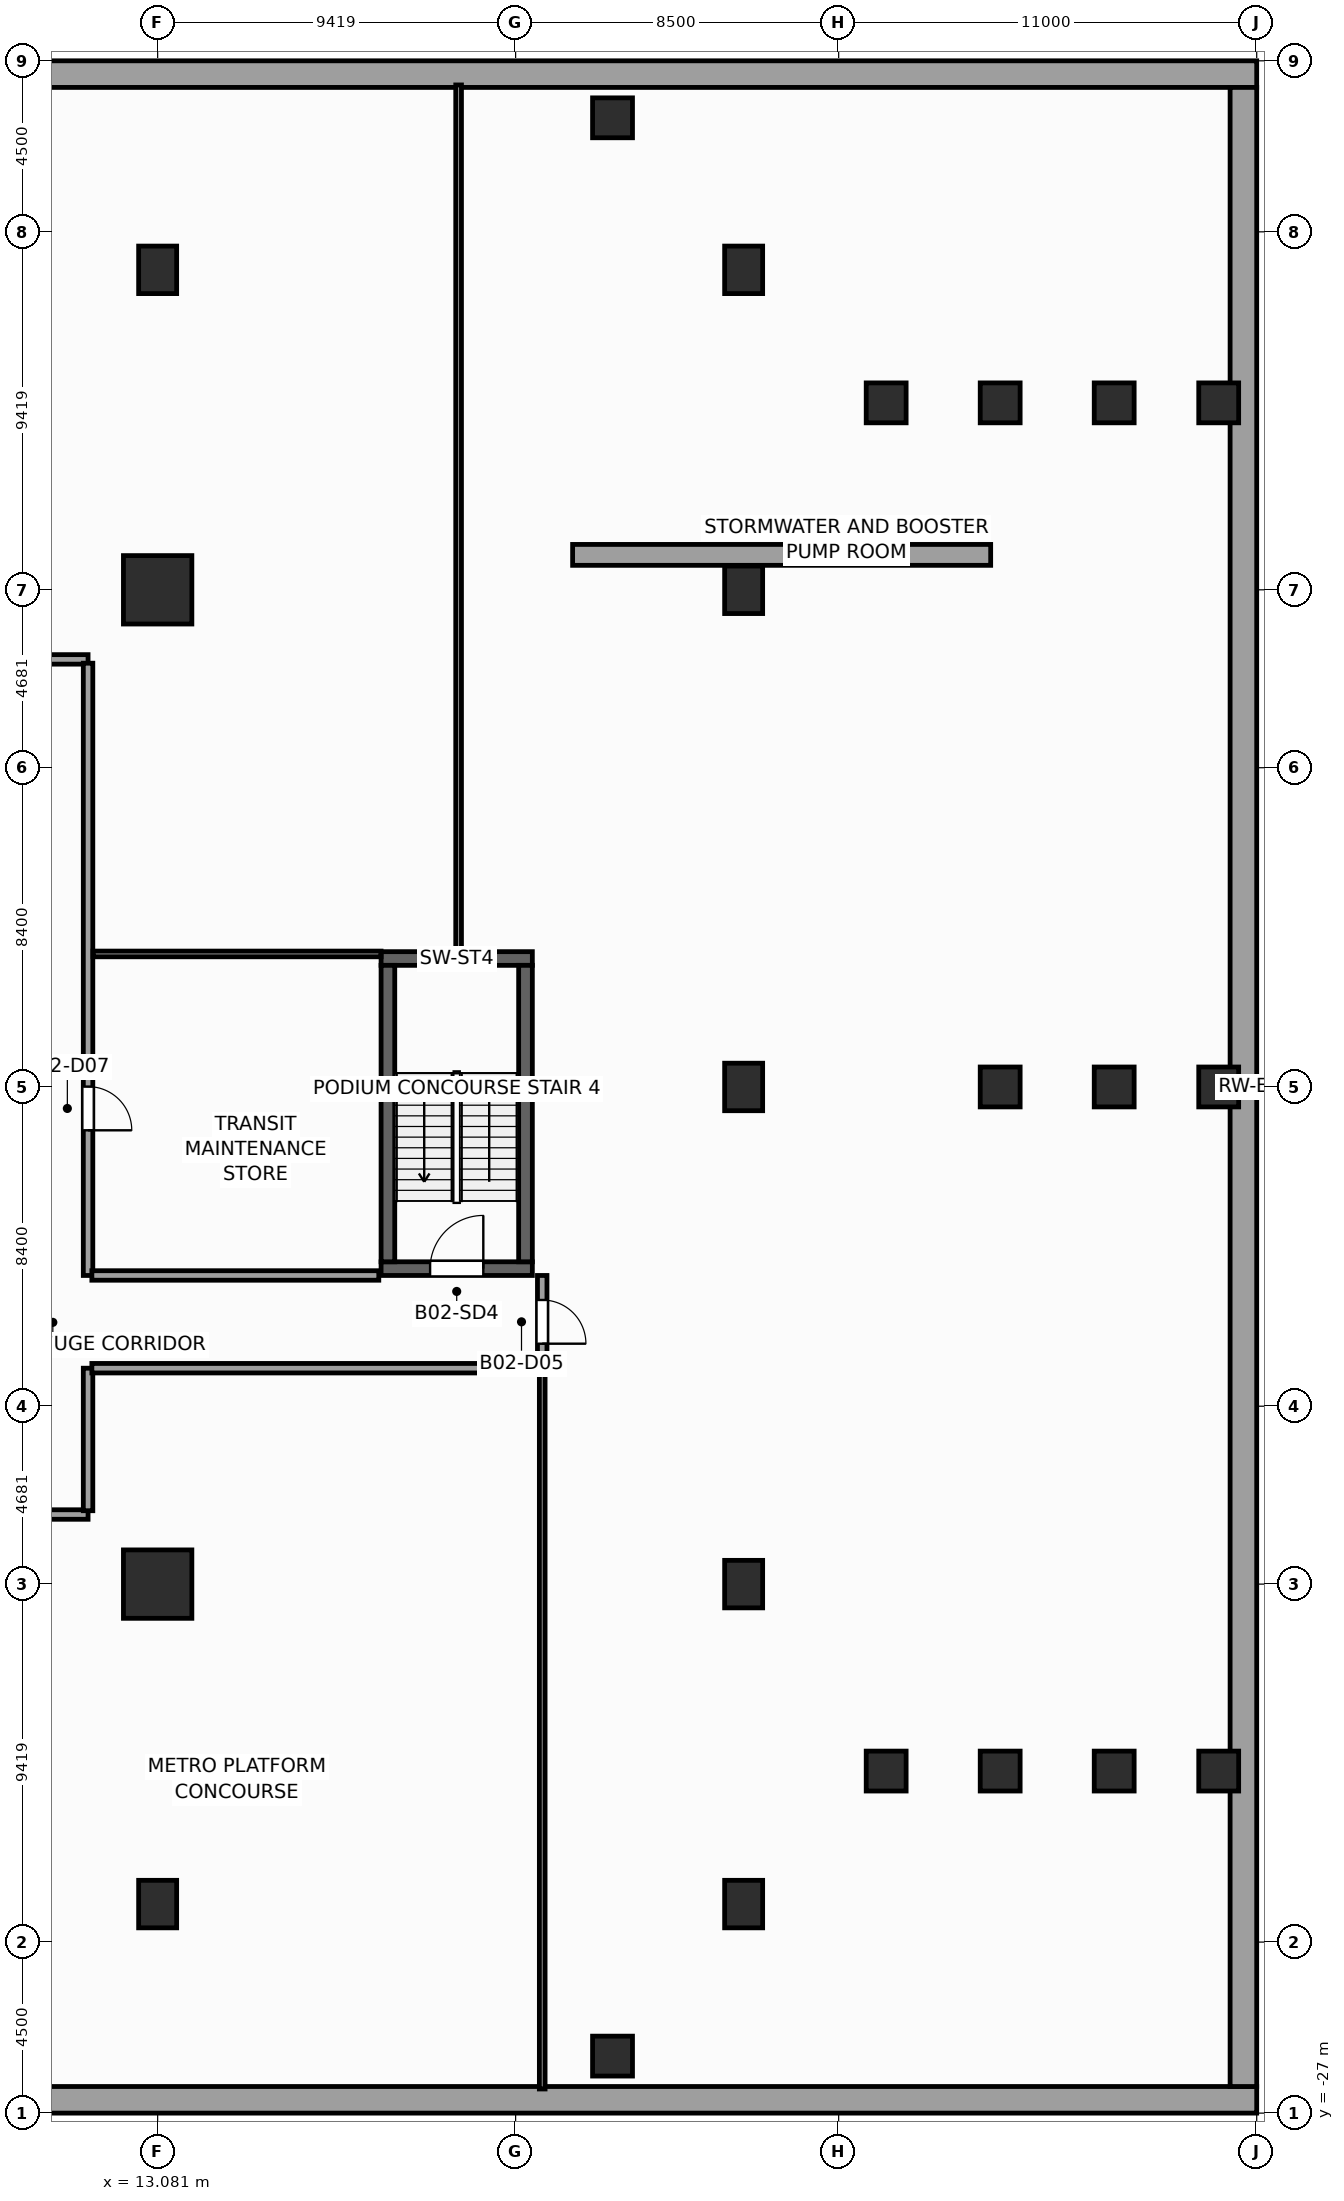
"""IFC4 building model, lengths in metres.
Left out: names, types, materials, properties, quantities, classifications, styles, units other than length and angle.
Written with IfcOpenShell. Run it as: python <this file> out.ifc"""

import sys

from ifc_helpers import new_model, si_unit, direction, frame, frame_2d, origin, origin_2d, place, context, subcontext, project, spatial, rectangle, extrude, source, transform, mapped, element, fill, save


model = new_model("IFC4")
c1 = context("Model", 3, precision=1e-05, world=origin(), true_north=direction((0.0, 1.0)))
c2 = subcontext(c1, "Body", "Model", "MODEL_VIEW")
j1 = project(units=[si_unit("LENGTHUNIT", "METRE"), si_unit("PLANEANGLEUNIT", "RADIAN")], contexts=[c1])
p1 = place(None, origin())
s1 = spatial("IfcSite", under=j1, at=p1, CompositionType="ELEMENT")
p2 = place(p1, origin())
s2 = spatial("IfcBuilding", under=s1, at=p2, CompositionType="ELEMENT")
p3 = place(p2, frame((0.0, 0.0, -9.0)))
s3 = spatial("IfcBuildingStorey", under=s2, at=p3, CompositionType="ELEMENT", Elevation=-9.0)
p4 = place(p3, frame((18.96, -4.78, 0.0), z_axis=(0.0, 0.0, 1.0), x_axis=(1.0, 0.0, 0.0)))
e1 = element("IfcWall", 1, at=p4, inside=s3, PredefinedType="SHEAR", context=c2, shape_type="SweptSolid", body=[
    extrude(rectangle(XDim=3.98, YDim=0.36, at=frame_2d((1.99, 0.0))), origin(), (0.0, 0.0, 1.0), 4.5),
])
p5 = place(p4, frame((1.29, 0.0, 0.0)))
e2 = element("IfcOpeningElement", 2, at=p5, cuts=e1, PredefinedType="OPENING", context=c2, shape_type="SweptSolid", body=[
    extrude(rectangle(XDim=1.4, YDim=2.2, at=frame_2d((0.7, 1.1))), frame((0.0, 0.19, 0.0), z_axis=(0.0, -1.0, 0.0), x_axis=(1.0, 0.0, 0.0)), (0.0, 0.0, 1.0), 0.38),
])
p6 = place(p3, frame((18.96, 3.38, 0.0), z_axis=(0.0, 0.0, 1.0), x_axis=(1.0, 0.0, 0.0)))
e3 = element("IfcWall", 3, at=p6, inside=s3, PredefinedType="SHEAR", context=c2, shape_type="SweptSolid", body=[
    extrude(rectangle(XDim=3.98, YDim=0.36, at=frame_2d((1.99, 0.0))), origin(), (0.0, 0.0, 1.0), 4.5),
])
for number, where, z_axis, x_axis in (
    (4, (19.14, -4.6, 0.0), (0.0, 0.0, 1.0), (0.0, 1.0, 0.0)),
    (5, (22.76, -4.6, 0.0), (0.0, 0.0, 1.0), (0.0, 1.0, 0.0)),
):
    element("IfcWall", number, at=place(p3, frame(where, z_axis=z_axis, x_axis=x_axis)), inside=s3, PredefinedType="SHEAR", context=c2, shape_type="SweptSolid", body=[
        extrude(rectangle(XDim=7.8, YDim=0.36, at=frame_2d((3.9, 0.0))), origin(), (0.0, 0.0, 1.0), 4.5),
    ])
for number, where, z_axis, x_axis in (
    (6, (-42.0, -26.65, 0.0), (0.0, 0.0, 1.0), (1.0, 0.0, 0.0)),
    (7, (-42.0, 26.65, 0.0), (0.0, 0.0, 1.0), (1.0, 0.0, 0.0)),
):
    element("IfcWall", number, at=place(p3, frame(where, z_axis=z_axis, x_axis=x_axis)), inside=s3, PredefinedType="USERDEFINED", context=c2, shape_type="SweptSolid", body=[
        extrude(rectangle(XDim=84.0, YDim=0.7, at=frame_2d((42.0, 0.0))), origin(), (0.0, 0.0, 1.0), 4.5),
    ])
p7 = place(p3, frame((41.65, -26.3, 0.0), z_axis=(0.0, 0.0, 1.0), x_axis=(0.0, 1.0, 0.0)))
e8 = element("IfcWall", 8, at=p7, inside=s3, PredefinedType="USERDEFINED", context=c2, shape_type="SweptSolid", body=[
    extrude(rectangle(XDim=52.6, YDim=0.7, at=frame_2d((26.3, 0.0))), origin(), (0.0, 0.0, 1.0), 4.5),
])
p8 = place(p3, frame((24.0, 14.0, 0.0), z_axis=(0.0, 0.0, 1.0), x_axis=(1.0, 0.0, 0.0)))
e9 = element("IfcWall", 9, at=p8, inside=s3, PredefinedType="USERDEFINED", context=c2, shape_type="SweptSolid", body=[
    extrude(rectangle(XDim=11.0, YDim=0.55, at=frame_2d((5.5, 0.0))), origin(), (0.0, 0.0, 1.0), 4.5),
])
m1 = source(origin(), c2, "Body", "SweptSolid", [
    extrude(rectangle(XDim=1.8, YDim=1.8, at=origin_2d()), origin(), (0.0, 0.0, 1.0), 4.5),
])
for number, where, z_axis, x_axis in (
    (10, (13.081, -13.081, 0.0), (0.0, 0.0, 1.0), (1.0, 0.0, 0.0)),
    (11, (13.081, 13.081, 0.0), (0.0, 0.0, 1.0), (1.0, 0.0, 0.0)),
):
    element("IfcColumn", number, at=place(p3, frame(where, z_axis=z_axis, x_axis=x_axis)), inside=s3, PredefinedType="COLUMN", context=c2, shape_type="MappedRepresentation", body=[
        mapped(m1, transform((0.0, 0.0, 0.0), scale=1.0)),
    ])
m2 = source(origin(), c2, "Body", "SweptSolid", [
    extrude(rectangle(XDim=1.0, YDim=1.25, at=origin_2d()), origin(), (0.0, 0.0, 1.0), 4.5),
])
for number, where, z_axis, x_axis in (
    (12, (13.081, -21.5, 0.0), (0.0, 0.0, 1.0), (1.0, 0.0, 0.0)),
    (13, (28.5, -21.5, 0.0), (0.0, 0.0, 1.0), (1.0, 0.0, 0.0)),
    (14, (13.081, 21.5, 0.0), (0.0, 0.0, 1.0), (1.0, 0.0, 0.0)),
    (15, (28.5, 21.5, 0.0), (0.0, 0.0, 1.0), (1.0, 0.0, 0.0)),
    (16, (28.5, -13.081, 0.0), (0.0, 0.0, 1.0), (1.0, 0.0, 0.0)),
    (17, (28.5, 0.0, 0.0), (0.0, 0.0, 1.0), (1.0, 0.0, 0.0)),
    (18, (28.5, 13.081, 0.0), (0.0, 0.0, 1.0), (1.0, 0.0, 0.0)),
):
    element("IfcColumn", number, at=place(p3, frame(where, z_axis=z_axis, x_axis=x_axis)), inside=s3, PredefinedType="COLUMN", context=c2, shape_type="MappedRepresentation", body=[
        mapped(m2, transform((0.0, 0.0, 0.0), scale=1.0)),
    ])
m3 = source(origin(), c2, "Body", "SweptSolid", [
    extrude(rectangle(XDim=1.05, YDim=1.05, at=origin_2d()), origin(), (0.0, 0.0, 1.0), 4.5),
])
for number, where, z_axis, x_axis in (
    (19, (25.05, -25.5, 0.0), (0.0, 0.0, 1.0), (1.0, 0.0, 0.0)),
    (20, (25.05, 25.5, 0.0), (0.0, 0.0, 1.0), (1.0, 0.0, 0.0)),
    (21, (32.25, -18.0, 0.0), (0.0, 0.0, 1.0), (1.0, 0.0, 0.0)),
    (22, (32.25, 18.0, 0.0), (0.0, 0.0, 1.0), (1.0, 0.0, 0.0)),
    (23, (35.25, -18.0, 0.0), (0.0, 0.0, 1.0), (1.0, 0.0, 0.0)),
    (24, (35.25, 0.0, 0.0), (0.0, 0.0, 1.0), (1.0, 0.0, 0.0)),
    (25, (35.25, 18.0, 0.0), (0.0, 0.0, 1.0), (1.0, 0.0, 0.0)),
    (26, (38.25, -18.0, 0.0), (0.0, 0.0, 1.0), (1.0, 0.0, 0.0)),
    (27, (38.25, 0.0, 0.0), (0.0, 0.0, 1.0), (1.0, 0.0, 0.0)),
    (28, (38.25, 18.0, 0.0), (0.0, 0.0, 1.0), (1.0, 0.0, 0.0)),
    (29, (41.0, -18.0, 0.0), (0.0, 0.0, 1.0), (1.0, 0.0, 0.0)),
    (30, (41.0, 0.0, 0.0), (0.0, 0.0, 1.0), (1.0, 0.0, 0.0)),
    (31, (41.0, 18.0, 0.0), (0.0, 0.0, 1.0), (1.0, 0.0, 0.0)),
):
    element("IfcColumn", number, at=place(p3, frame(where, z_axis=z_axis, x_axis=x_axis)), inside=s3, PredefinedType="COLUMN", context=c2, shape_type="MappedRepresentation", body=[
        mapped(m3, transform((0.0, 0.0, 0.0), scale=1.0)),
    ])
p9 = place(p3, frame((-11.25, -11.25, 0.0), z_axis=(0.0, 0.0, 1.0), x_axis=(1.0, 0.0, 0.0)))
e32 = element("IfcWall", 32, at=p9, inside=s3, PredefinedType="PARTITIONING", context=c2, shape_type="SweptSolid", body=[
    extrude(rectangle(XDim=22.5, YDim=0.25, at=frame_2d((11.25, 0.0))), origin(), (0.0, 0.0, 1.0), 4.18),
])
p10 = place(p9, frame((1.755, 0.0, 0.0)))
e33 = element("IfcOpeningElement", 33, at=p10, cuts=e32, PredefinedType="OPENING", context=c2, shape_type="SweptSolid", body=[
    extrude(rectangle(XDim=0.95, YDim=2.1, at=frame_2d((0.475, 1.05))), frame((0.0, 0.135, 0.0), z_axis=(0.0, -1.0, 0.0), x_axis=(1.0, 0.0, 0.0)), (0.0, 0.0, 1.0), 0.27),
])
p11 = place(p9, frame((12.27, 0.0, 0.0)))
e34 = element("IfcOpeningElement", 34, at=p11, cuts=e32, PredefinedType="OPENING", context=c2, shape_type="SweptSolid", body=[
    extrude(rectangle(XDim=1.15, YDim=2.25, at=frame_2d((0.575, 1.125))), frame((0.0, 0.135, 0.0), z_axis=(0.0, -1.0, 0.0), x_axis=(1.0, 0.0, 0.0)), (0.0, 0.0, 1.0), 0.27),
])
p12 = place(p3, frame((-11.25, 11.25, 0.0), z_axis=(0.0, 0.0, 1.0), x_axis=(1.0, 0.0, 0.0)))
e35 = element("IfcWall", 35, at=p12, inside=s3, PredefinedType="PARTITIONING", context=c2, shape_type="SweptSolid", body=[
    extrude(rectangle(XDim=22.5, YDim=0.25, at=frame_2d((11.25, 0.0))), origin(), (0.0, 0.0, 1.0), 4.18),
])
p13 = place(p12, frame((10.675, 0.0, 0.0)))
e36 = element("IfcOpeningElement", 36, at=p13, cuts=e35, PredefinedType="OPENING", context=c2, shape_type="SweptSolid", body=[
    extrude(rectangle(XDim=1.15, YDim=2.25, at=frame_2d((0.575, 1.125))), frame((0.0, 0.135, 0.0), z_axis=(0.0, -1.0, 0.0), x_axis=(1.0, 0.0, 0.0)), (0.0, 0.0, 1.0), 0.27),
])
p14 = place(p3, frame((11.25, -11.15, 0.0), z_axis=(0.0, 0.0, 1.0), x_axis=(0.0, 1.0, 0.0)))
e37 = element("IfcWall", 37, at=p14, inside=s3, PredefinedType="PARTITIONING", context=c2, shape_type="SweptSolid", body=[
    extrude(rectangle(XDim=3.75, YDim=0.25, at=frame_2d((1.875, 0.0))), origin(), (0.0, 0.0, 1.0), 4.18),
])
p15 = place(p3, frame((11.25, -4.96, 0.0), z_axis=(0.0, 0.0, 1.0), x_axis=(0.0, 1.0, 0.0)))
e38 = element("IfcWall", 38, at=p15, inside=s3, PredefinedType="PARTITIONING", context=c2, shape_type="SweptSolid", body=[
    extrude(rectangle(XDim=16.11, YDim=0.25, at=frame_2d((8.055, 0.0))), origin(), (0.0, 0.0, 1.0), 4.18),
])
p16 = place(p15, frame((3.82, 0.0, 0.0)))
e39 = element("IfcOpeningElement", 39, at=p16, cuts=e38, PredefinedType="OPENING", context=c2, shape_type="SweptSolid", body=[
    extrude(rectangle(XDim=1.15, YDim=2.25, at=frame_2d((0.575, 1.125))), frame((0.0, 0.135, 0.0), z_axis=(0.0, -1.0, 0.0), x_axis=(1.0, 0.0, 0.0)), (0.0, 0.0, 1.0), 0.27),
])
p17 = place(p3, frame((11.35, -7.4, 0.0), z_axis=(0.0, 0.0, 1.0), x_axis=(1.0, 0.0, 0.0)))
e40 = element("IfcWall", 40, at=p17, inside=s3, PredefinedType="PARTITIONING", context=c2, shape_type="SweptSolid", body=[
    extrude(rectangle(XDim=11.85, YDim=0.25, at=frame_2d((5.925, 0.0))), origin(), (0.0, 0.0, 1.0), 4.18),
])
p18 = place(p3, frame((11.35, -4.96, 0.0), z_axis=(0.0, 0.0, 1.0), x_axis=(1.0, 0.0, 0.0)))
e41 = element("IfcWall", 41, at=p18, inside=s3, PredefinedType="PARTITIONING", context=c2, shape_type="SweptSolid", body=[
    extrude(rectangle(XDim=7.55, YDim=0.25, at=frame_2d((3.775, 0.0))), origin(), (0.0, 0.0, 1.0), 4.18),
])
p19 = place(p3, frame((23.2, -7.4, 0.0), z_axis=(0.0, 0.0, 1.0), x_axis=(0.0, 1.0, 0.0)))
e42 = element("IfcWall", 42, at=p19, inside=s3, PredefinedType="PARTITIONING", context=c2, shape_type="SweptSolid", body=[
    extrude(rectangle(XDim=2.44, YDim=0.25, at=frame_2d((1.22, 0.0))), origin(), (0.0, 0.0, 1.0), 4.18),
])
p20 = place(p19, frame((0.645, 0.0, 0.0)))
e43 = element("IfcOpeningElement", 43, at=p20, cuts=e42, PredefinedType="OPENING", context=c2, shape_type="SweptSolid", body=[
    extrude(rectangle(XDim=1.15, YDim=2.25, at=frame_2d((0.575, 1.125))), frame((0.0, 0.135, 0.0), z_axis=(0.0, -1.0, 0.0), x_axis=(1.0, 0.0, 0.0)), (0.0, 0.0, 1.0), 0.27),
])
p21 = place(p3, frame((23.2, -26.365, 0.0), z_axis=(0.0, 0.0, 1.0), x_axis=(0.0, 1.0, 0.0)))
e44 = element("IfcWall", 44, at=p21, inside=s3, PredefinedType="PARTITIONING", context=c2, shape_type="SweptSolid", body=[
    extrude(rectangle(XDim=18.835, YDim=0.15, at=frame_2d((9.417, 0.0))), origin(), (0.0, 0.0, 1.0), 4.18),
])
p22 = place(p3, frame((21.0, 3.56, 0.0), z_axis=(0.0, 0.0, 1.0), x_axis=(0.0, 1.0, 0.0)))
e45 = element("IfcWall", 45, at=p22, inside=s3, PredefinedType="PARTITIONING", context=c2, shape_type="SweptSolid", body=[
    extrude(rectangle(XDim=22.805, YDim=0.15, at=frame_2d((11.402, 0.0))), origin(), (0.0, 0.0, 1.0), 4.18),
])
p23 = place(p3, frame((11.38, 3.5, 0.0), z_axis=(0.0, 0.0, 1.0), x_axis=(1.0, 0.0, 0.0)))
e46 = element("IfcWall", 46, at=p23, inside=s3, PredefinedType="PARTITIONING", context=c2, shape_type="SweptSolid", body=[
    extrude(rectangle(XDim=7.58, YDim=0.15, at=frame_2d((3.79, 0.0))), origin(), (0.0, 0.0, 1.0), 4.18),
])
m4 = source(origin(), c2, "Body", "SweptSolid", [
    extrude(rectangle(XDim=1.4, YDim=2.2, at=frame_2d((0.7, 1.1))), frame((0.0, 0.025, 0.0), z_axis=(0.0, -1.0, 0.0), x_axis=(1.0, 0.0, 0.0)), (0.0, 0.0, 1.0), 0.05),
])
p24 = place(p5, origin())
e47 = element("IfcDoor", 47, at=p24, inside=s3, OperationType="SINGLE_SWING_RIGHT", PredefinedType="DOOR", context=c2, shape_type="MappedRepresentation", body=[
    mapped(m4, transform((0.0, 0.0, 0.0), scale=1.0)),
])
fill(e2, e47)
m5 = source(origin(), c2, "Body", "SweptSolid", [
    extrude(rectangle(XDim=1.15, YDim=2.25, at=frame_2d((0.575, 1.125))), frame((0.0, 0.025, 0.0), z_axis=(0.0, -1.0, 0.0), x_axis=(1.0, 0.0, 0.0)), (0.0, 0.0, 1.0), 0.05),
])
p25 = place(p20, frame((1.15, 0.0, 0.0), z_axis=(0.0, 0.0, 1.0), x_axis=(-1.0, 0.0, 0.0)))
e48 = element("IfcDoor", 48, at=p25, inside=s3, OperationType="SINGLE_SWING_LEFT", PredefinedType="DOOR", context=c2, shape_type="MappedRepresentation", body=[
    mapped(m5, transform((0.0, 0.0, 0.0), scale=1.0)),
])
fill(e43, e48)
p26 = place(p16, frame((1.15, 0.0, 0.0), z_axis=(0.0, 0.0, 1.0), x_axis=(-1.0, 0.0, 0.0)))
e49 = element("IfcDoor", 49, at=p26, inside=s3, OperationType="SINGLE_SWING_LEFT", PredefinedType="DOOR", context=c2, shape_type="MappedRepresentation", body=[
    mapped(m5, transform((0.0, 0.0, 0.0), scale=1.0)),
])
fill(e39, e49)
save(model, sys.argv[1])
